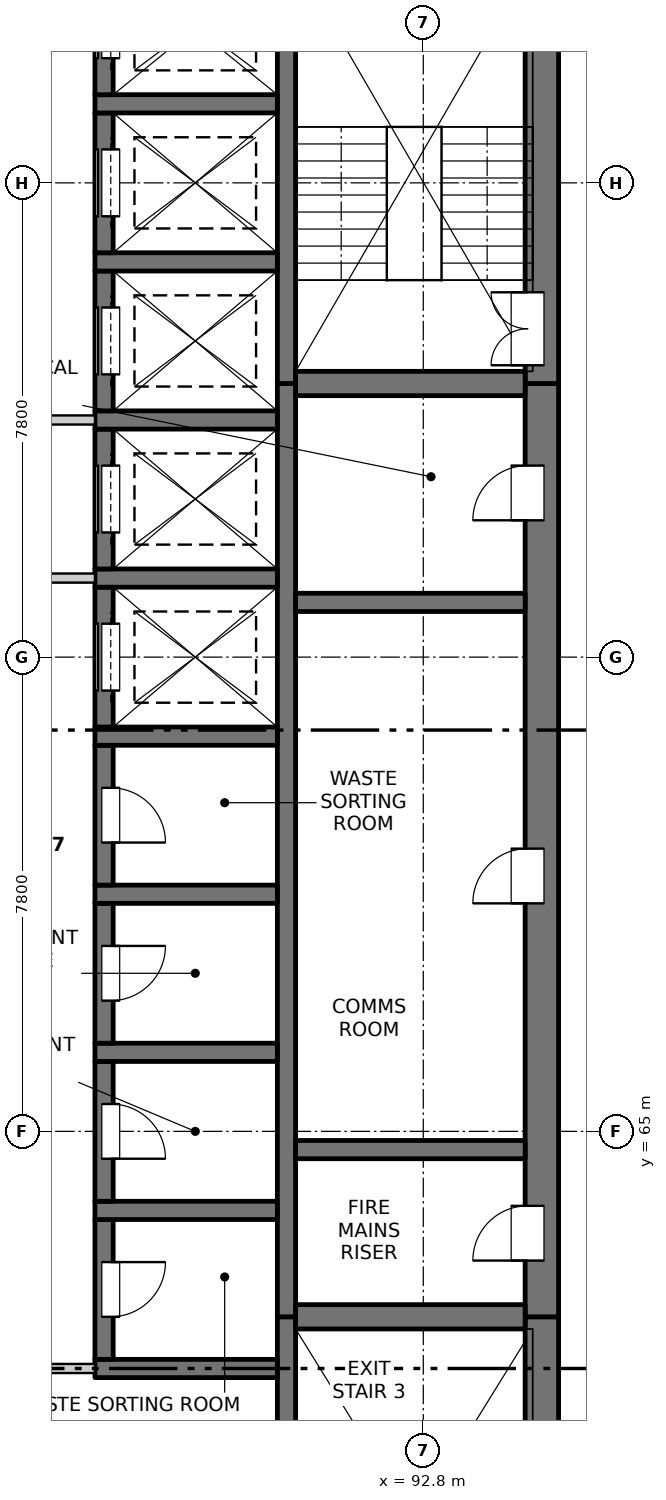
"""IFC4 building model, lengths in metres.
Left out: names, types, materials, properties, quantities, classifications, styles, units other than length and angle.
Written with IfcOpenShell. Run it as: python <this file> out.ifc"""

import sys

from ifc_helpers import new_model, si_unit, direction, frame, frame_2d, origin, place, context, subcontext, project, spatial, rectangle, extrude, element, fill, save


model = new_model("IFC4")
c1 = context("Model", 3, precision=1e-05, world=origin(), true_north=direction((0.0, 1.0)))
c2 = subcontext(c1, "Body", "Model", "MODEL_VIEW")
j1 = project(units=[si_unit("LENGTHUNIT", "METRE"), si_unit("PLANEANGLEUNIT", "RADIAN")], contexts=[c1])
p1 = place(None, origin())
s1 = spatial("IfcSite", under=j1, at=p1, CompositionType="ELEMENT")
p2 = place(p1, origin())
s2 = spatial("IfcBuilding", under=s1, at=p2, CompositionType="ELEMENT")
p3 = place(p2, frame((0.0, 0.0, 182.6)))
s3 = spatial("IfcBuildingStorey", under=s2, at=p3, CompositionType="ELEMENT", Elevation=182.6)
p4 = place(p3, frame((94.75, 54.975, -0.25), z_axis=(0.0, 0.0, 1.0), x_axis=(0.0, 1.0, 0.0)))
e1 = element("IfcWall", 1, at=p4, inside=s3, PredefinedType="SOLIDWALL", context=c2, shape_type="SweptSolid", body=[
    extrude(rectangle(XDim=6.975, YDim=0.55, at=frame_2d((3.487, 0.0))), origin(), (0.0, 0.0, 1.0), 3.4),
])
p5 = place(p4, frame((0.675, 0.0, 0.25)))
e2 = element("IfcOpeningElement", 2, at=p5, cuts=e1, PredefinedType="OPENING", context=c2, shape_type="SweptSolid", body=[
    extrude(rectangle(XDim=1.2, YDim=2.1, at=frame_2d((0.6, 1.05))), frame((0.0, 0.285, 0.0), z_axis=(0.0, -1.0, 0.0), x_axis=(1.0, 0.0, 0.0)), (0.0, 0.0, 1.0), 0.57),
])
p6 = place(p3, frame((94.75, 61.95, -0.25), z_axis=(0.0, 0.0, 1.0), x_axis=(0.0, 1.0, 0.0)))
e3 = element("IfcWall", 3, at=p6, inside=s3, PredefinedType="SOLIDWALL", context=c2, shape_type="SweptSolid", body=[
    extrude(rectangle(XDim=15.35, YDim=0.55, at=frame_2d((7.675, 0.0))), origin(), (0.0, 0.0, 1.0), 3.4),
])
p7 = place(p6, frame((0.925, 0.0, 0.25)))
e4 = element("IfcOpeningElement", 4, at=p7, cuts=e3, PredefinedType="OPENING", context=c2, shape_type="SweptSolid", body=[
    extrude(rectangle(XDim=0.9, YDim=2.1, at=frame_2d((0.45, 1.05))), frame((0.0, 0.285, 0.0), z_axis=(0.0, -1.0, 0.0), x_axis=(1.0, 0.0, 0.0)), (0.0, 0.0, 1.0), 0.57),
])
p8 = place(p6, frame((6.8, 0.0, 0.25)))
e5 = element("IfcOpeningElement", 5, at=p8, cuts=e3, PredefinedType="OPENING", context=c2, shape_type="SweptSolid", body=[
    extrude(rectangle(XDim=0.9, YDim=2.1, at=frame_2d((0.45, 1.05))), frame((0.0, 0.285, 0.0), z_axis=(0.0, -1.0, 0.0), x_axis=(1.0, 0.0, 0.0)), (0.0, 0.0, 1.0), 0.57),
])
p9 = place(p6, frame((13.1, 0.0, 0.25)))
e6 = element("IfcOpeningElement", 6, at=p9, cuts=e3, PredefinedType="OPENING", context=c2, shape_type="SweptSolid", body=[
    extrude(rectangle(XDim=0.9, YDim=2.1, at=frame_2d((0.45, 1.05))), frame((0.0, 0.285, 0.0), z_axis=(0.0, -1.0, 0.0), x_axis=(1.0, 0.0, 0.0)), (0.0, 0.0, 1.0), 0.57),
])
p10 = place(p3, frame((94.75, 77.3, -0.25), z_axis=(0.0, 0.0, 1.0), x_axis=(0.0, 1.0, 0.0)))
e7 = element("IfcWall", 7, at=p10, inside=s3, PredefinedType="SOLIDWALL", context=c2, shape_type="SweptSolid", body=[
    extrude(rectangle(XDim=7.475, YDim=0.55, at=frame_2d((3.737, 0.0))), origin(), (0.0, 0.0, 1.0), 3.4),
])
p11 = place(p10, frame((0.3, 0.0, 0.25)))
e8 = element("IfcOpeningElement", 8, at=p11, cuts=e7, PredefinedType="OPENING", context=c2, shape_type="SweptSolid", body=[
    extrude(rectangle(XDim=1.2, YDim=2.1, at=frame_2d((0.6, 1.05))), frame((0.0, 0.285, 0.0), z_axis=(0.0, -1.0, 0.0), x_axis=(1.0, 0.0, 0.0)), (0.0, 0.0, 1.0), 0.57),
])
p12 = place(p3, frame((90.55, 55.525, -0.25), z_axis=(0.0, 0.0, 1.0), x_axis=(0.0, 1.0, 0.0)))
e9 = element("IfcWall", 9, at=p12, inside=s3, PredefinedType="SOLIDWALL", context=c2, shape_type="SweptSolid", body=[
    extrude(rectangle(XDim=6.425, YDim=0.3, at=frame_2d((3.212, 0.0))), origin(), (0.0, 0.0, 1.0), 3.4),
])
p13 = place(p12, frame((0.125, 0.0, 0.25)))
e10 = element("IfcOpeningElement", 10, at=p13, cuts=e9, PredefinedType="OPENING", context=c2, shape_type="SweptSolid", body=[
    extrude(rectangle(XDim=1.2, YDim=2.1, at=frame_2d((0.6, 1.05))), frame((0.0, 0.16, 0.0), z_axis=(0.0, -1.0, 0.0), x_axis=(1.0, 0.0, 0.0)), (0.0, 0.0, 1.0), 0.32),
])
p14 = place(p3, frame((90.55, 61.95, -0.25), z_axis=(0.0, 0.0, 1.0), x_axis=(0.0, 1.0, 0.0)))
e11 = element("IfcWall", 11, at=p14, inside=s3, PredefinedType="SOLIDWALL", context=c2, shape_type="SweptSolid", body=[
    extrude(rectangle(XDim=15.35, YDim=0.3, at=frame_2d((7.675, 0.0))), origin(), (0.0, 0.0, 1.0), 3.4),
])
p15 = place(p3, frame((90.55, 77.3, -0.25), z_axis=(0.0, 0.0, 1.0), x_axis=(0.0, 1.0, 0.0)))
e12 = element("IfcWall", 12, at=p15, inside=s3, PredefinedType="SOLIDWALL", context=c2, shape_type="SweptSolid", body=[
    extrude(rectangle(XDim=6.925, YDim=0.3, at=frame_2d((3.462, 0.0))), origin(), (0.0, 0.0, 1.0), 3.4),
])
p16 = place(p3, frame((87.4, 61.1, -0.25), z_axis=(0.0, 0.0, 1.0), x_axis=(1.0, 0.0, 0.0)))
e13 = element("IfcWall", 13, at=p16, inside=s3, PredefinedType="SOLIDWALL", context=c2, shape_type="SweptSolid", body=[
    extrude(rectangle(XDim=3.0, YDim=0.3, at=frame_2d((1.5, 0.0))), origin(), (0.0, 0.0, 1.0), 3.4),
])
p17 = place(p3, frame((87.55, 61.25, -0.25), z_axis=(0.0, 0.0, 1.0), x_axis=(0.0, 1.0, 0.0)))
e14 = element("IfcWall", 14, at=p17, inside=s3, PredefinedType="SOLIDWALL", context=c2, shape_type="SweptSolid", body=[
    extrude(rectangle(XDim=2.3, YDim=0.3, at=frame_2d((1.15, 0.0))), origin(), (0.0, 0.0, 1.0), 3.4),
])
p18 = place(p17, frame((0.7, 0.0, 0.25)))
e15 = element("IfcOpeningElement", 15, at=p18, cuts=e14, PredefinedType="OPENING", context=c2, shape_type="SweptSolid", body=[
    extrude(rectangle(XDim=0.9, YDim=2.1, at=frame_2d((0.45, 1.05))), frame((0.0, 0.16, 0.0), z_axis=(0.0, -1.0, 0.0), x_axis=(1.0, 0.0, 0.0)), (0.0, 0.0, 1.0), 0.32),
])
p19 = place(p3, frame((87.4, 63.7, -0.25), z_axis=(0.0, 0.0, 1.0), x_axis=(1.0, 0.0, 0.0)))
e16 = element("IfcWall", 16, at=p19, inside=s3, PredefinedType="SOLIDWALL", context=c2, shape_type="SweptSolid", body=[
    extrude(rectangle(XDim=3.0, YDim=0.3, at=frame_2d((1.5, 0.0))), origin(), (0.0, 0.0, 1.0), 3.4),
])
p20 = place(p3, frame((87.55, 63.85, -0.25), z_axis=(0.0, 0.0, 1.0), x_axis=(0.0, 1.0, 0.0)))
e17 = element("IfcWall", 17, at=p20, inside=s3, PredefinedType="SOLIDWALL", context=c2, shape_type="SweptSolid", body=[
    extrude(rectangle(XDim=2.3, YDim=0.3, at=frame_2d((1.15, 0.0))), origin(), (0.0, 0.0, 1.0), 3.4),
])
p21 = place(p20, frame((0.7, 0.0, 0.25)))
e18 = element("IfcOpeningElement", 18, at=p21, cuts=e17, PredefinedType="OPENING", context=c2, shape_type="SweptSolid", body=[
    extrude(rectangle(XDim=0.9, YDim=2.1, at=frame_2d((0.45, 1.05))), frame((0.0, 0.16, 0.0), z_axis=(0.0, -1.0, 0.0), x_axis=(1.0, 0.0, 0.0)), (0.0, 0.0, 1.0), 0.32),
])
p22 = place(p3, frame((87.4, 66.3, -0.25), z_axis=(0.0, 0.0, 1.0), x_axis=(1.0, 0.0, 0.0)))
e19 = element("IfcWall", 19, at=p22, inside=s3, PredefinedType="SOLIDWALL", context=c2, shape_type="SweptSolid", body=[
    extrude(rectangle(XDim=3.0, YDim=0.3, at=frame_2d((1.5, 0.0))), origin(), (0.0, 0.0, 1.0), 3.4),
])
p23 = place(p3, frame((87.55, 66.45, -0.25), z_axis=(0.0, 0.0, 1.0), x_axis=(0.0, 1.0, 0.0)))
e20 = element("IfcWall", 20, at=p23, inside=s3, PredefinedType="SOLIDWALL", context=c2, shape_type="SweptSolid", body=[
    extrude(rectangle(XDim=2.3, YDim=0.3, at=frame_2d((1.15, 0.0))), origin(), (0.0, 0.0, 1.0), 3.4),
])
p24 = place(p23, frame((0.7, 0.0, 0.25)))
e21 = element("IfcOpeningElement", 21, at=p24, cuts=e20, PredefinedType="OPENING", context=c2, shape_type="SweptSolid", body=[
    extrude(rectangle(XDim=0.9, YDim=2.1, at=frame_2d((0.45, 1.05))), frame((0.0, 0.16, 0.0), z_axis=(0.0, -1.0, 0.0), x_axis=(1.0, 0.0, 0.0)), (0.0, 0.0, 1.0), 0.32),
])
p25 = place(p3, frame((87.4, 68.9, -0.25), z_axis=(0.0, 0.0, 1.0), x_axis=(1.0, 0.0, 0.0)))
e22 = element("IfcWall", 22, at=p25, inside=s3, PredefinedType="SOLIDWALL", context=c2, shape_type="SweptSolid", body=[
    extrude(rectangle(XDim=3.0, YDim=0.3, at=frame_2d((1.5, 0.0))), origin(), (0.0, 0.0, 1.0), 3.4),
])
p26 = place(p3, frame((87.55, 69.05, -0.25), z_axis=(0.0, 0.0, 1.0), x_axis=(0.0, 1.0, 0.0)))
e23 = element("IfcWall", 23, at=p26, inside=s3, PredefinedType="SOLIDWALL", context=c2, shape_type="SweptSolid", body=[
    extrude(rectangle(XDim=2.3, YDim=0.3, at=frame_2d((1.15, 0.0))), origin(), (0.0, 0.0, 1.0), 3.4),
])
p27 = place(p26, frame((0.7, 0.0, 0.25)))
e24 = element("IfcOpeningElement", 24, at=p27, cuts=e23, PredefinedType="OPENING", context=c2, shape_type="SweptSolid", body=[
    extrude(rectangle(XDim=0.9, YDim=2.1, at=frame_2d((0.45, 1.05))), frame((0.0, 0.16, 0.0), z_axis=(0.0, -1.0, 0.0), x_axis=(1.0, 0.0, 0.0)), (0.0, 0.0, 1.0), 0.32),
])
p28 = place(p3, frame((87.4, 71.5, -0.25), z_axis=(0.0, 0.0, 1.0), x_axis=(1.0, 0.0, 0.0)))
e25 = element("IfcWall", 25, at=p28, inside=s3, PredefinedType="SOLIDWALL", context=c2, shape_type="SweptSolid", body=[
    extrude(rectangle(XDim=3.0, YDim=0.3, at=frame_2d((1.5, 0.0))), origin(), (0.0, 0.0, 1.0), 3.4),
])
p29 = place(p3, frame((87.55, 71.65, -0.25), z_axis=(0.0, 0.0, 1.0), x_axis=(0.0, 1.0, 0.0)))
e26 = element("IfcWall", 26, at=p29, inside=s3, PredefinedType="SOLIDWALL", context=c2, shape_type="SweptSolid", body=[
    extrude(rectangle(XDim=2.3, YDim=0.3, at=frame_2d((1.15, 0.0))), origin(), (0.0, 0.0, 1.0), 3.4),
])
p30 = place(p29, frame((0.6, 0.0, 0.25)))
e27 = element("IfcOpeningElement", 27, at=p30, cuts=e26, PredefinedType="OPENING", context=c2, shape_type="SweptSolid", body=[
    extrude(rectangle(XDim=1.1, YDim=2.1, at=frame_2d((0.55, 1.05))), frame((0.0, 0.16, 0.0), z_axis=(0.0, -1.0, 0.0), x_axis=(1.0, 0.0, 0.0)), (0.0, 0.0, 1.0), 0.32),
])
p31 = place(p3, frame((87.4, 74.1, -0.25), z_axis=(0.0, 0.0, 1.0), x_axis=(1.0, 0.0, 0.0)))
e28 = element("IfcWall", 28, at=p31, inside=s3, PredefinedType="SOLIDWALL", context=c2, shape_type="SweptSolid", body=[
    extrude(rectangle(XDim=3.0, YDim=0.3, at=frame_2d((1.5, 0.0))), origin(), (0.0, 0.0, 1.0), 3.4),
])
p32 = place(p3, frame((87.55, 74.25, -0.25), z_axis=(0.0, 0.0, 1.0), x_axis=(0.0, 1.0, 0.0)))
e29 = element("IfcWall", 29, at=p32, inside=s3, PredefinedType="SOLIDWALL", context=c2, shape_type="SweptSolid", body=[
    extrude(rectangle(XDim=2.3, YDim=0.3, at=frame_2d((1.15, 0.0))), origin(), (0.0, 0.0, 1.0), 3.4),
])
p33 = place(p32, frame((0.6, 0.0, 0.25)))
e30 = element("IfcOpeningElement", 30, at=p33, cuts=e29, PredefinedType="OPENING", context=c2, shape_type="SweptSolid", body=[
    extrude(rectangle(XDim=1.1, YDim=2.1, at=frame_2d((0.55, 1.05))), frame((0.0, 0.16, 0.0), z_axis=(0.0, -1.0, 0.0), x_axis=(1.0, 0.0, 0.0)), (0.0, 0.0, 1.0), 0.32),
])
p34 = place(p3, frame((87.4, 76.7, -0.25), z_axis=(0.0, 0.0, 1.0), x_axis=(1.0, 0.0, 0.0)))
e31 = element("IfcWall", 31, at=p34, inside=s3, PredefinedType="SOLIDWALL", context=c2, shape_type="SweptSolid", body=[
    extrude(rectangle(XDim=3.0, YDim=0.3, at=frame_2d((1.5, 0.0))), origin(), (0.0, 0.0, 1.0), 3.4),
])
p35 = place(p3, frame((87.55, 76.85, -0.25), z_axis=(0.0, 0.0, 1.0), x_axis=(0.0, 1.0, 0.0)))
e32 = element("IfcWall", 32, at=p35, inside=s3, PredefinedType="SOLIDWALL", context=c2, shape_type="SweptSolid", body=[
    extrude(rectangle(XDim=2.3, YDim=0.3, at=frame_2d((1.15, 0.0))), origin(), (0.0, 0.0, 1.0), 3.4),
])
p36 = place(p35, frame((0.6, 0.0, 0.25)))
e33 = element("IfcOpeningElement", 33, at=p36, cuts=e32, PredefinedType="OPENING", context=c2, shape_type="SweptSolid", body=[
    extrude(rectangle(XDim=1.1, YDim=2.1, at=frame_2d((0.55, 1.05))), frame((0.0, 0.16, 0.0), z_axis=(0.0, -1.0, 0.0), x_axis=(1.0, 0.0, 0.0)), (0.0, 0.0, 1.0), 0.32),
])
p37 = place(p3, frame((87.4, 79.3, -0.25), z_axis=(0.0, 0.0, 1.0), x_axis=(1.0, 0.0, 0.0)))
e34 = element("IfcWall", 34, at=p37, inside=s3, PredefinedType="SOLIDWALL", context=c2, shape_type="SweptSolid", body=[
    extrude(rectangle(XDim=3.0, YDim=0.3, at=frame_2d((1.5, 0.0))), origin(), (0.0, 0.0, 1.0), 3.4),
])
p38 = place(p3, frame((87.55, 79.45, -0.25), z_axis=(0.0, 0.0, 1.0), x_axis=(0.0, 1.0, 0.0)))
e35 = element("IfcWall", 35, at=p38, inside=s3, PredefinedType="SOLIDWALL", context=c2, shape_type="SweptSolid", body=[
    extrude(rectangle(XDim=2.3, YDim=0.3, at=frame_2d((1.15, 0.0))), origin(), (0.0, 0.0, 1.0), 3.4),
])
p39 = place(p38, frame((0.6, 0.0, 0.25)))
e36 = element("IfcOpeningElement", 36, at=p39, cuts=e35, PredefinedType="OPENING", context=c2, shape_type="SweptSolid", body=[
    extrude(rectangle(XDim=1.1, YDim=2.1, at=frame_2d((0.55, 1.05))), frame((0.0, 0.16, 0.0), z_axis=(0.0, -1.0, 0.0), x_axis=(1.0, 0.0, 0.0)), (0.0, 0.0, 1.0), 0.32),
])
p40 = place(p3, frame((87.4, 81.9, -0.25), z_axis=(0.0, 0.0, 1.0), x_axis=(1.0, 0.0, 0.0)))
e37 = element("IfcWall", 37, at=p40, inside=s3, PredefinedType="SOLIDWALL", context=c2, shape_type="SweptSolid", body=[
    extrude(rectangle(XDim=3.0, YDim=0.3, at=frame_2d((1.5, 0.0))), origin(), (0.0, 0.0, 1.0), 3.4),
])
p41 = place(p3, frame((87.55, 82.05, -0.25), z_axis=(0.0, 0.0, 1.0), x_axis=(0.0, 1.0, 0.0)))
e38 = element("IfcWall", 38, at=p41, inside=s3, PredefinedType="SOLIDWALL", context=c2, shape_type="SweptSolid", body=[
    extrude(rectangle(XDim=2.175, YDim=0.3, at=frame_2d((1.087, 0.0))), origin(), (0.0, 0.0, 1.0), 3.4),
])
p42 = place(p41, frame((0.6, 0.0, 0.25)))
e39 = element("IfcOpeningElement", 39, at=p42, cuts=e38, PredefinedType="OPENING", context=c2, shape_type="SweptSolid", body=[
    extrude(rectangle(XDim=1.1, YDim=2.1, at=frame_2d((0.55, 1.05))), frame((0.0, 0.16, 0.0), z_axis=(0.0, -1.0, 0.0), x_axis=(1.0, 0.0, 0.0)), (0.0, 0.0, 1.0), 0.32),
])
p43 = place(p3, frame((90.7, 61.95, -0.25), z_axis=(0.0, 0.0, 1.0), x_axis=(1.0, 0.0, 0.0)))
e40 = element("IfcWall", 40, at=p43, inside=s3, PredefinedType="SOLIDWALL", context=c2, shape_type="SweptSolid", body=[
    extrude(rectangle(XDim=3.775, YDim=0.4, at=frame_2d((1.888, 0.0))), origin(), (0.0, 0.0, 1.0), 3.4),
])
for number, where, z_axis, x_axis in (
    (41, (90.7, 64.7, -0.25), (0.0, 0.0, 1.0), (1.0, 0.0, 0.0)),
    (42, (90.7, 73.7, -0.25), (0.0, 0.0, 1.0), (1.0, 0.0, 0.0)),
):
    element("IfcWall", number, at=place(p3, frame(where, z_axis=z_axis, x_axis=x_axis)), inside=s3, PredefinedType="SOLIDWALL", context=c2, shape_type="SweptSolid", body=[
        extrude(rectangle(XDim=3.775, YDim=0.3, at=frame_2d((1.888, 0.0))), origin(), (0.0, 0.0, 1.0), 3.4),
    ])
p44 = place(p3, frame((90.7, 77.3, -0.25), z_axis=(0.0, 0.0, 1.0), x_axis=(1.0, 0.0, 0.0)))
e43 = element("IfcWall", 43, at=p44, inside=s3, PredefinedType="SOLIDWALL", context=c2, shape_type="SweptSolid", body=[
    extrude(rectangle(XDim=3.775, YDim=0.4, at=frame_2d((1.888, 0.0))), origin(), (0.0, 0.0, 1.0), 3.4),
])
p45 = place(p3, frame((82.6, 61.1, 0.0), z_axis=(0.0, 0.0, 1.0), x_axis=(1.0, 0.0, 0.0)))
e44 = element("IfcWall", 44, at=p45, inside=s3, PredefinedType="PARTITIONING", context=c2, shape_type="SweptSolid", body=[
    extrude(rectangle(XDim=4.8, YDim=0.15, at=frame_2d((2.4, 0.0))), origin(), (0.0, 0.0, 1.0), 3.15),
])
p46 = place(p45, frame((1.5, 0.0, 0.0)))
e45 = element("IfcOpeningElement", 45, at=p46, cuts=e44, PredefinedType="OPENING", context=c2, shape_type="SweptSolid", body=[
    extrude(rectangle(XDim=1.8, YDim=2.1, at=frame_2d((0.9, 1.05))), frame((0.0, 0.085, 0.0), z_axis=(0.0, -1.0, 0.0), x_axis=(1.0, 0.0, 0.0)), (0.0, 0.0, 1.0), 0.17),
])
p47 = place(p3, frame((82.6, 74.1, 0.0), z_axis=(0.0, 0.0, 1.0), x_axis=(1.0, 0.0, 0.0)))
e46 = element("IfcWall", 46, at=p47, inside=s3, PredefinedType="PARTITIONING", context=c2, shape_type="SweptSolid", body=[
    extrude(rectangle(XDim=4.8, YDim=0.15, at=frame_2d((2.4, 0.0))), origin(), (0.0, 0.0, 1.0), 3.15),
])
p48 = place(p47, frame((1.5, 0.0, 0.0)))
e47 = element("IfcOpeningElement", 47, at=p48, cuts=e46, PredefinedType="OPENING", context=c2, shape_type="SweptSolid", body=[
    extrude(rectangle(XDim=1.8, YDim=2.1, at=frame_2d((0.9, 1.05))), frame((0.0, 0.085, 0.0), z_axis=(0.0, -1.0, 0.0), x_axis=(1.0, 0.0, 0.0)), (0.0, 0.0, 1.0), 0.17),
])
p49 = place(p3, frame((82.6, 76.7, 0.0), z_axis=(0.0, 0.0, 1.0), x_axis=(1.0, 0.0, 0.0)))
e48 = element("IfcWall", 48, at=p49, inside=s3, PredefinedType="PARTITIONING", context=c2, shape_type="SweptSolid", body=[
    extrude(rectangle(XDim=4.8, YDim=0.15, at=frame_2d((2.4, 0.0))), origin(), (0.0, 0.0, 1.0), 3.15),
])
p50 = place(p49, frame((1.5, 0.0, 0.0)))
e49 = element("IfcOpeningElement", 49, at=p50, cuts=e48, PredefinedType="OPENING", context=c2, shape_type="SweptSolid", body=[
    extrude(rectangle(XDim=1.8, YDim=2.1, at=frame_2d((0.9, 1.05))), frame((0.0, 0.085, 0.0), z_axis=(0.0, -1.0, 0.0), x_axis=(1.0, 0.0, 0.0)), (0.0, 0.0, 1.0), 0.17),
])
p51 = place(p18, origin())
e50 = element("IfcDoor", 50, at=p51, inside=s3, OperationType="SINGLE_SWING_LEFT", PredefinedType="DOOR", context=c2, shape_type="SweptSolid", body=[
    extrude(rectangle(XDim=0.9, YDim=2.1, at=frame_2d((0.45, 1.05))), frame((0.0, -0.085, 0.0), z_axis=(0.0, -1.0, 0.0), x_axis=(1.0, 0.0, 0.0)), (0.0, 0.0, 1.0), 0.05),
])
fill(e15, e50)
p52 = place(p7, origin())
e51 = element("IfcDoor", 51, at=p52, inside=s3, OperationType="SINGLE_SWING_LEFT", PredefinedType="DOOR", context=c2, shape_type="SweptSolid", body=[
    extrude(rectangle(XDim=0.9, YDim=2.1, at=frame_2d((0.45, 1.05))), frame((0.0, 0.26, 0.0), z_axis=(0.0, -1.0, 0.0), x_axis=(1.0, 0.0, 0.0)), (0.0, 0.0, 1.0), 0.05),
])
fill(e4, e51)
p53 = place(p21, origin())
e52 = element("IfcDoor", 52, at=p53, inside=s3, OperationType="SINGLE_SWING_RIGHT", PredefinedType="DOOR", context=c2, shape_type="SweptSolid", body=[
    extrude(rectangle(XDim=0.9, YDim=2.1, at=frame_2d((0.45, 1.05))), frame((0.0, -0.085, 0.0), z_axis=(0.0, -1.0, 0.0), x_axis=(1.0, 0.0, 0.0)), (0.0, 0.0, 1.0), 0.05),
])
fill(e18, e52)
p54 = place(p24, origin())
e53 = element("IfcDoor", 53, at=p54, inside=s3, OperationType="SINGLE_SWING_LEFT", PredefinedType="DOOR", context=c2, shape_type="SweptSolid", body=[
    extrude(rectangle(XDim=0.9, YDim=2.1, at=frame_2d((0.45, 1.05))), frame((0.0, -0.085, 0.0), z_axis=(0.0, -1.0, 0.0), x_axis=(1.0, 0.0, 0.0)), (0.0, 0.0, 1.0), 0.05),
])
fill(e21, e53)
p55 = place(p8, origin())
e54 = element("IfcDoor", 54, at=p55, inside=s3, OperationType="SINGLE_SWING_LEFT", PredefinedType="DOOR", context=c2, shape_type="SweptSolid", body=[
    extrude(rectangle(XDim=0.9, YDim=2.1, at=frame_2d((0.45, 1.05))), frame((0.0, 0.26, 0.0), z_axis=(0.0, -1.0, 0.0), x_axis=(1.0, 0.0, 0.0)), (0.0, 0.0, 1.0), 0.05),
])
fill(e5, e54)
p56 = place(p27, origin())
e55 = element("IfcDoor", 55, at=p56, inside=s3, OperationType="SINGLE_SWING_RIGHT", PredefinedType="DOOR", context=c2, shape_type="SweptSolid", body=[
    extrude(rectangle(XDim=0.9, YDim=2.1, at=frame_2d((0.45, 1.05))), frame((0.0, -0.085, 0.0), z_axis=(0.0, -1.0, 0.0), x_axis=(1.0, 0.0, 0.0)), (0.0, 0.0, 1.0), 0.05),
])
fill(e24, e55)
p57 = place(p30, origin())
e56 = element("IfcDoor", 56, at=p57, inside=s3, OperationType="SLIDING_TO_LEFT", PredefinedType="DOOR", context=c2, shape_type="SweptSolid", body=[
    extrude(rectangle(XDim=1.1, YDim=2.1, at=frame_2d((0.55, 1.05))), frame((0.0, -0.085, 0.0), z_axis=(0.0, -1.0, 0.0), x_axis=(1.0, 0.0, 0.0)), (0.0, 0.0, 1.0), 0.05),
])
fill(e27, e56)
p58 = place(p33, origin())
e57 = element("IfcDoor", 57, at=p58, inside=s3, OperationType="SLIDING_TO_LEFT", PredefinedType="DOOR", context=c2, shape_type="SweptSolid", body=[
    extrude(rectangle(XDim=1.1, YDim=2.1, at=frame_2d((0.55, 1.05))), frame((0.0, -0.085, 0.0), z_axis=(0.0, -1.0, 0.0), x_axis=(1.0, 0.0, 0.0)), (0.0, 0.0, 1.0), 0.05),
])
fill(e30, e57)
p59 = place(p9, origin())
e58 = element("IfcDoor", 58, at=p59, inside=s3, OperationType="SINGLE_SWING_LEFT", PredefinedType="DOOR", context=c2, shape_type="SweptSolid", body=[
    extrude(rectangle(XDim=0.9, YDim=2.1, at=frame_2d((0.45, 1.05))), frame((0.0, 0.26, 0.0), z_axis=(0.0, -1.0, 0.0), x_axis=(1.0, 0.0, 0.0)), (0.0, 0.0, 1.0), 0.05),
])
fill(e6, e58)
p60 = place(p36, origin())
e59 = element("IfcDoor", 59, at=p60, inside=s3, OperationType="SLIDING_TO_LEFT", PredefinedType="DOOR", context=c2, shape_type="SweptSolid", body=[
    extrude(rectangle(XDim=1.1, YDim=2.1, at=frame_2d((0.55, 1.05))), frame((0.0, -0.085, 0.0), z_axis=(0.0, -1.0, 0.0), x_axis=(1.0, 0.0, 0.0)), (0.0, 0.0, 1.0), 0.05),
])
fill(e33, e59)
p61 = place(p11, origin())
e60 = element("IfcDoor", 60, at=p61, inside=s3, OperationType="DOUBLE_DOOR_SINGLE_SWING", PredefinedType="DOOR", context=c2, shape_type="SweptSolid", body=[
    extrude(rectangle(XDim=1.2, YDim=2.1, at=frame_2d((0.6, 1.05))), frame((0.0, 0.26, 0.0), z_axis=(0.0, -1.0, 0.0), x_axis=(1.0, 0.0, 0.0)), (0.0, 0.0, 1.0), 0.05),
])
fill(e8, e60)
p62 = place(p39, origin())
e61 = element("IfcDoor", 61, at=p62, inside=s3, OperationType="SLIDING_TO_RIGHT", PredefinedType="DOOR", context=c2, shape_type="SweptSolid", body=[
    extrude(rectangle(XDim=1.1, YDim=2.1, at=frame_2d((0.55, 1.05))), frame((0.0, -0.085, 0.0), z_axis=(0.0, -1.0, 0.0), x_axis=(1.0, 0.0, 0.0)), (0.0, 0.0, 1.0), 0.05),
])
fill(e36, e61)
p63 = place(p42, origin())
e62 = element("IfcDoor", 62, at=p63, inside=s3, OperationType="SLIDING_TO_RIGHT", PredefinedType="DOOR", context=c2, shape_type="SweptSolid", body=[
    extrude(rectangle(XDim=1.1, YDim=2.1, at=frame_2d((0.55, 1.05))), frame((0.0, -0.085, 0.0), z_axis=(0.0, -1.0, 0.0), x_axis=(1.0, 0.0, 0.0)), (0.0, 0.0, 1.0), 0.05),
])
fill(e39, e62)
save(model, sys.argv[1])
